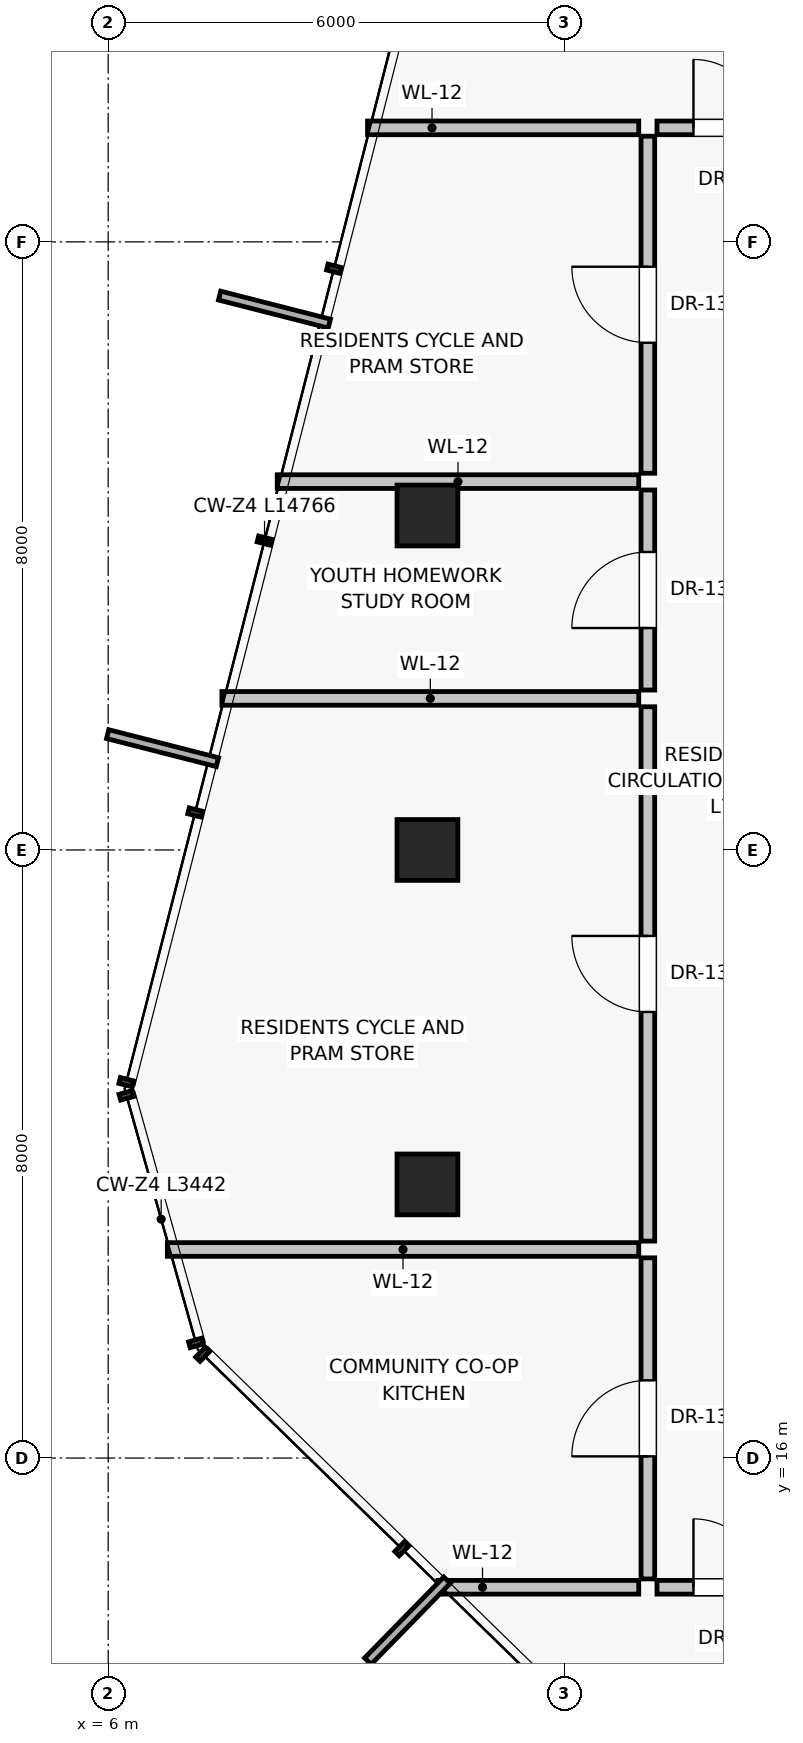
"""IFC4 building model, lengths in metres.
Left out: names, types, materials, properties, quantities, classifications, styles, units other than length and angle.
Written with IfcOpenShell. Run it as: python <this file> out.ifc"""

import sys

from ifc_helpers import new_model, si_unit, direction, frame, frame_2d, origin, origin_2d, place, context, subcontext, project, spatial, rectangle, extrude, source, transform, mapped, element, fill, save


model = new_model("IFC4")
c1 = context("Model", 3, precision=1e-05, world=origin(), true_north=direction((0.0, 1.0)))
c2 = subcontext(c1, "Body", "Model", "MODEL_VIEW")
j1 = project(units=[si_unit("LENGTHUNIT", "METRE"), si_unit("PLANEANGLEUNIT", "RADIAN")], contexts=[c1])
p1 = place(None, origin())
s1 = spatial("IfcSite", under=j1, at=p1, CompositionType="ELEMENT")
p2 = place(p1, origin())
s2 = spatial("IfcBuilding", under=s1, at=p2, CompositionType="ELEMENT")
p3 = place(p2, frame((0.0, 0.0, 257.75)))
s3 = spatial("IfcBuildingStorey", under=s2, at=p3, CompositionType="ELEMENT", Elevation=257.75)
for number, where, z_axis, x_axis in (
    (1, (10.2, 28.4, 0.0), (0.0, 0.0, 1.0), (1.0, 0.0, 0.0)),
    (2, (10.2, 24.0, 0.0), (0.0, 0.0, 1.0), (1.0, 0.0, 0.0)),
    (3, (10.2, 19.6, 0.0), (0.0, 0.0, 1.0), (1.0, 0.0, 0.0)),
):
    element("IfcColumn", number, at=place(p3, frame(where, z_axis=z_axis, x_axis=x_axis)), inside=s3, PredefinedType="COLUMN", context=c2, shape_type="SweptSolid", body=[
        extrude(rectangle(XDim=0.8, YDim=0.8, at=origin_2d()), origin(), (0.0, 0.0, 1.0), 3.25),
    ])
p4 = place(p3, frame((12.98, 14.3, 0.0), z_axis=(0.0, 0.0, 1.0), x_axis=(-1.0, 0.0, 0.0)))
e4 = element("IfcWall", 4, at=p4, inside=s3, PredefinedType="PARTITIONING", context=c2, shape_type="SweptSolid", body=[
    extrude(rectangle(XDim=2.641, YDim=0.18, at=frame_2d((1.321, 0.0))), origin(), (0.0, 0.0, 1.0), 3.015),
])
p5 = place(p3, frame((12.98, 33.5, 0.0), z_axis=(0.0, 0.0, 1.0), x_axis=(-1.0, 0.0, 0.0)))
e5 = element("IfcWall", 5, at=p5, inside=s3, PredefinedType="PARTITIONING", context=c2, shape_type="SweptSolid", body=[
    extrude(rectangle(XDim=3.568, YDim=0.18, at=frame_2d((1.784, 0.0))), origin(), (0.0, 0.0, 1.0), 3.015),
])
p6 = place(p3, frame((13.1, 14.41, 0.0), z_axis=(0.0, 0.0, 1.0), x_axis=(0.0, 1.0, 0.0)))
e6 = element("IfcWall", 6, at=p6, inside=s3, PredefinedType="PARTITIONING", context=c2, shape_type="SweptSolid", body=[
    extrude(rectangle(XDim=4.224, YDim=0.18, at=frame_2d((2.112, 0.0))), origin(), (0.0, 0.0, 1.0), 2.662),
])
p7 = place(p6, frame((1.612, 0.0, 0.0)))
e7 = element("IfcOpeningElement", 7, at=p7, cuts=e6, PredefinedType="OPENING", context=c2, shape_type="SweptSolid", body=[
    extrude(rectangle(XDim=1.0, YDim=2.01, at=frame_2d((0.5, 1.005))), frame((0.0, 0.1, 0.0), z_axis=(0.0, -1.0, 0.0), x_axis=(1.0, 0.0, 0.0)), (0.0, 0.0, 1.0), 0.2),
])
p8 = place(p3, frame((13.1, 18.854, 0.0), z_axis=(0.0, 0.0, 1.0), x_axis=(0.0, 1.0, 0.0)))
e8 = element("IfcWall", 8, at=p8, inside=s3, PredefinedType="PARTITIONING", context=c2, shape_type="SweptSolid", body=[
    extrude(rectangle(XDim=7.03, YDim=0.18, at=frame_2d((3.515, 0.0))), origin(), (0.0, 0.0, 1.0), 2.662),
])
p9 = place(p8, frame((3.015, 0.0, 0.0)))
e9 = element("IfcOpeningElement", 9, at=p9, cuts=e8, PredefinedType="OPENING", context=c2, shape_type="SweptSolid", body=[
    extrude(rectangle(XDim=1.0, YDim=2.01, at=frame_2d((0.5, 1.005))), frame((0.0, 0.1, 0.0), z_axis=(0.0, -1.0, 0.0), x_axis=(1.0, 0.0, 0.0)), (0.0, 0.0, 1.0), 0.2),
])
p10 = place(p3, frame((12.98, 18.744, 0.0), z_axis=(0.0, 0.0, 1.0), x_axis=(-1.0, 0.0, 0.0)))
e10 = element("IfcWall", 10, at=p10, inside=s3, PredefinedType="PARTITIONING", context=c2, shape_type="SweptSolid", body=[
    extrude(rectangle(XDim=6.202, YDim=0.18, at=frame_2d((3.101, 0.0))), origin(), (0.0, 0.0, 1.0), 3.015),
])
p11 = place(p3, frame((12.98, 25.994, 0.0), z_axis=(0.0, 0.0, 1.0), x_axis=(-1.0, 0.0, 0.0)))
e11 = element("IfcWall", 11, at=p11, inside=s3, PredefinedType="PARTITIONING", context=c2, shape_type="SweptSolid", body=[
    extrude(rectangle(XDim=5.484, YDim=0.18, at=frame_2d((2.742, 0.0))), origin(), (0.0, 0.0, 1.0), 3.015),
])
p12 = place(p3, frame((13.1, 26.104, 0.0), z_axis=(0.0, 0.0, 1.0), x_axis=(0.0, 1.0, 0.0)))
e12 = element("IfcWall", 12, at=p12, inside=s3, PredefinedType="PARTITIONING", context=c2, shape_type="SweptSolid", body=[
    extrude(rectangle(XDim=2.632, YDim=0.18, at=frame_2d((1.316, 0.0))), origin(), (0.0, 0.0, 1.0), 2.662),
])
p13 = place(p12, frame((0.816, 0.0, 0.0)))
e13 = element("IfcOpeningElement", 13, at=p13, cuts=e12, PredefinedType="OPENING", context=c2, shape_type="SweptSolid", body=[
    extrude(rectangle(XDim=1.0, YDim=2.01, at=frame_2d((0.5, 1.005))), frame((0.0, 0.1, 0.0), z_axis=(0.0, -1.0, 0.0), x_axis=(1.0, 0.0, 0.0)), (0.0, 0.0, 1.0), 0.2),
])
p14 = place(p3, frame((13.1, 28.956, 0.0), z_axis=(0.0, 0.0, 1.0), x_axis=(0.0, 1.0, 0.0)))
e14 = element("IfcWall", 14, at=p14, inside=s3, PredefinedType="PARTITIONING", context=c2, shape_type="SweptSolid", body=[
    extrude(rectangle(XDim=4.434, YDim=0.18, at=frame_2d((2.217, 0.0))), origin(), (0.0, 0.0, 1.0), 2.662),
])
p15 = place(p14, frame((1.717, 0.0, 0.0)))
e15 = element("IfcOpeningElement", 15, at=p15, cuts=e14, PredefinedType="OPENING", context=c2, shape_type="SweptSolid", body=[
    extrude(rectangle(XDim=1.0, YDim=2.01, at=frame_2d((0.5, 1.005))), frame((0.0, 0.1, 0.0), z_axis=(0.0, -1.0, 0.0), x_axis=(1.0, 0.0, 0.0)), (0.0, 0.0, 1.0), 0.2),
])
p16 = place(p3, frame((12.98, 28.846, 0.0), z_axis=(0.0, 0.0, 1.0), x_axis=(-1.0, 0.0, 0.0)))
e16 = element("IfcWall", 16, at=p16, inside=s3, PredefinedType="PARTITIONING", context=c2, shape_type="SweptSolid", body=[
    extrude(rectangle(XDim=4.756, YDim=0.18, at=frame_2d((2.378, 0.0))), origin(), (0.0, 0.0, 1.0), 3.015),
])
p17 = place(p3, frame((13.22, 14.3, 0.0), z_axis=(0.0, 0.0, 1.0), x_axis=(1.0, 0.0, 0.0)))
e17 = element("IfcWall", 17, at=p17, inside=s3, PredefinedType="PARTITIONING", context=c2, shape_type="SweptSolid", body=[
    extrude(rectangle(XDim=1.86, YDim=0.18, at=frame_2d((0.93, 0.0))), origin(), (0.0, 0.0, 1.0), 3.015),
])
p18 = place(p17, frame((0.48, 0.0, 0.0)))
e18 = element("IfcOpeningElement", 18, at=p18, cuts=e17, PredefinedType="OPENING", context=c2, shape_type="SweptSolid", body=[
    extrude(rectangle(XDim=0.9, YDim=2.01, at=frame_2d((0.45, 1.005))), frame((0.0, 0.1, 0.0), z_axis=(0.0, -1.0, 0.0), x_axis=(1.0, 0.0, 0.0)), (0.0, 0.0, 1.0), 0.2),
])
p19 = place(p3, frame((13.22, 33.5, 0.0), z_axis=(0.0, 0.0, 1.0), x_axis=(1.0, 0.0, 0.0)))
e19 = element("IfcWall", 19, at=p19, inside=s3, PredefinedType="PARTITIONING", context=c2, shape_type="SweptSolid", body=[
    extrude(rectangle(XDim=1.86, YDim=0.18, at=frame_2d((0.93, 0.0))), origin(), (0.0, 0.0, 1.0), 3.015),
])
p20 = place(p19, frame((0.48, 0.0, 0.0)))
e20 = element("IfcOpeningElement", 20, at=p20, cuts=e19, PredefinedType="OPENING", context=c2, shape_type="SweptSolid", body=[
    extrude(rectangle(XDim=0.9, YDim=2.01, at=frame_2d((0.45, 1.005))), frame((0.0, 0.1, 0.0), z_axis=(0.0, -1.0, 0.0), x_axis=(1.0, 0.0, 0.0)), (0.0, 0.0, 1.0), 0.2),
])
m1 = source(origin(), c2, "Body", "SweptSolid", [
    extrude(rectangle(XDim=1.0, YDim=2.01, at=frame_2d((0.5, 1.005))), frame((0.0, 0.025, 0.0), z_axis=(0.0, -1.0, 0.0), x_axis=(1.0, 0.0, 0.0)), (0.0, 0.0, 1.0), 0.05),
])
p21 = place(p7, origin())
e21 = element("IfcDoor", 21, at=p21, inside=s3, OperationType="SINGLE_SWING_LEFT", PredefinedType="DOOR", context=c2, shape_type="MappedRepresentation", body=[
    mapped(m1, transform((0.0, 0.0, 0.0), scale=1.0)),
])
fill(e7, e21)
p22 = place(p9, origin())
e22 = element("IfcDoor", 22, at=p22, inside=s3, OperationType="SINGLE_SWING_RIGHT", PredefinedType="DOOR", context=c2, shape_type="MappedRepresentation", body=[
    mapped(m1, transform((0.0, 0.0, 0.0), scale=1.0)),
])
fill(e9, e22)
p23 = place(p13, origin())
e23 = element("IfcDoor", 23, at=p23, inside=s3, OperationType="SINGLE_SWING_LEFT", PredefinedType="DOOR", context=c2, shape_type="MappedRepresentation", body=[
    mapped(m1, transform((0.0, 0.0, 0.0), scale=1.0)),
])
fill(e13, e23)
p24 = place(p15, origin())
e24 = element("IfcDoor", 24, at=p24, inside=s3, OperationType="SINGLE_SWING_RIGHT", PredefinedType="DOOR", context=c2, shape_type="MappedRepresentation", body=[
    mapped(m1, transform((0.0, 0.0, 0.0), scale=1.0)),
])
fill(e15, e24)
m2 = source(origin(), c2, "Body", "SweptSolid", [
    extrude(rectangle(XDim=0.9, YDim=2.01, at=frame_2d((0.45, 1.005))), frame((0.0, 0.025, 0.0), z_axis=(0.0, -1.0, 0.0), x_axis=(1.0, 0.0, 0.0)), (0.0, 0.0, 1.0), 0.05),
])
p25 = place(p18, origin())
e25 = element("IfcDoor", 25, at=p25, inside=s3, OperationType="SINGLE_SWING_LEFT", PredefinedType="DOOR", context=c2, shape_type="MappedRepresentation", body=[
    mapped(m2, transform((0.0, 0.0, 0.0), scale=1.0)),
])
fill(e18, e25)
p26 = place(p20, origin())
e26 = element("IfcDoor", 26, at=p26, inside=s3, OperationType="SINGLE_SWING_LEFT", PredefinedType="DOOR", context=c2, shape_type="MappedRepresentation", body=[
    mapped(m2, transform((0.0, 0.0, 0.0), scale=1.0)),
])
fill(e20, e26)
save(model, sys.argv[1])
